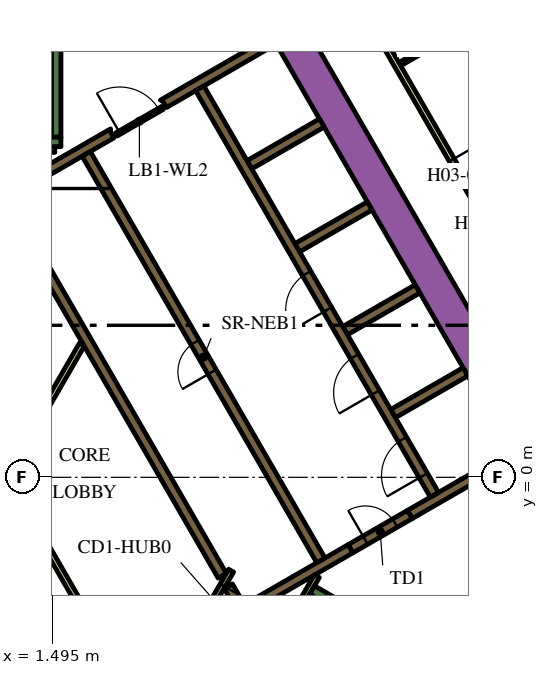
"""IFC4 building model, lengths in metres.
Left out: names, types, materials, properties, quantities, classifications, styles, units other than length and angle.
Written with IfcOpenShell. Run it as: python <this file> out.ifc"""

import sys

from ifc_helpers import new_model, si_unit, direction, frame, frame_2d, origin, place, context, subcontext, project, spatial, polyline, rectangle, outline, extrude, element, fill, save


model = new_model("IFC4")
c1 = context("Model", 3, precision=1e-05, world=origin(), true_north=direction((0.0, 1.0)))
c2 = subcontext(c1, "Body", "Model", "MODEL_VIEW")
j1 = project(units=[si_unit("LENGTHUNIT", "METRE"), si_unit("PLANEANGLEUNIT", "RADIAN")], contexts=[c1])
p1 = place(None, origin())
s1 = spatial("IfcSite", under=j1, at=p1, CompositionType="ELEMENT")
p2 = place(p1, origin())
s2 = spatial("IfcBuilding", under=s1, at=p2, CompositionType="ELEMENT")
p3 = place(p2, frame((0.0, 0.0, 51.0)))
s3 = spatial("IfcBuildingStorey", under=s2, at=p3, CompositionType="ELEMENT", Elevation=51.0)
p4 = place(p3, frame((6.776, 13.364, 0.0), z_axis=(0.0, 0.0, 1.0), x_axis=(0.500004177138, -0.8660229921, 0.0)))
e1 = element("IfcWall", 1, at=p4, inside=s3, PredefinedType="SOLIDWALL", context=c2, shape_type="SweptSolid", body=[
    extrude(rectangle(XDim=20.204, YDim=0.9, at=frame_2d((10.102, 0.0))), origin(), (0.0, 0.0, 1.0), 3.9),
])
p5 = place(p3, frame((8.334, -2.964, 0.0), z_axis=(0.0, 0.0, 1.0), x_axis=(0.866016039709, -0.500016218704, 0.0)))
e2 = element("IfcWall", 2, at=p5, inside=s3, PredefinedType="SOLIDWALL", context=c2, shape_type="SweptSolid", body=[
    extrude(rectangle(XDim=7.05, YDim=0.25, at=frame_2d((3.525, 0.0))), origin(), (0.0, 0.0, 1.0), 3.9),
])
p6 = place(p3, frame((8.168, -3.503, 0.0), z_axis=(0.0, 0.0, 1.0), x_axis=(0.49972245349, 0.866185586049, 0.0)))
e3 = element("IfcWall", 3, at=p6, inside=s3, PredefinedType="SOLIDWALL", context=c2, shape_type="SweptSolid", body=[
    extrude(rectangle(XDim=0.425, YDim=0.25, at=frame_2d((0.212, 0.0))), origin(), (0.0, 0.0, 1.0), 3.9),
])
p7 = place(p3, frame((1.6, 8.95, 0.0), z_axis=(0.0, 0.0, 1.0), x_axis=(0.0, 1.0, 0.0)))
e4 = element("IfcWall", 4, at=p7, inside=s3, PredefinedType="SOLIDWALL", context=c2, shape_type="SweptSolid", body=[
    extrude(rectangle(XDim=6.8, YDim=0.25, at=frame_2d((3.4, 0.0))), origin(), (0.0, 0.0, 1.0), 3.9),
])
p8 = place(p3, frame((1.05, 8.825, 0.0), z_axis=(0.0, 0.0, 1.0), x_axis=(1.0, 0.0, 0.0)))
e5 = element("IfcWall", 5, at=p8, inside=s3, PredefinedType="SOLIDWALL", context=c2, shape_type="SweptSolid", body=[
    extrude(rectangle(XDim=0.675, YDim=0.25, at=frame_2d((0.337, 0.0))), origin(), (0.0, 0.0, 1.0), 3.9),
])
p9 = place(p3, frame((10.464, 1.677, 0.0), z_axis=(0.0, 0.0, 1.0), x_axis=(0.86605622881, 0.499946605688, 0.0)))
e6 = element("IfcWall", 6, at=p9, inside=s3, PredefinedType="SOLIDWALL", context=c2, shape_type="SweptSolid", body=[
    extrude(rectangle(XDim=2.2, YDim=0.25, at=frame_2d((1.1, 0.0))), origin(), (0.0, 0.0, 1.0), 3.9),
])
p10 = place(p3, frame((13.629, 0.594, 0.0), z_axis=(0.0, 0.0, 1.0), x_axis=(-0.86602790099, -0.499995674689, 0.0)))
e7 = element("IfcWall", 7, at=p10, inside=s3, PredefinedType="SOLIDWALL", context=c2, shape_type="SweptSolid", body=[
    extrude(rectangle(XDim=3.146, YDim=0.25, at=frame_2d((1.573, 0.0))), origin(), (0.0, 0.0, 1.0), 3.9),
])
p11 = place(p3, frame((9.346, -1.879, 0.0), z_axis=(0.0, 0.0, 1.0), x_axis=(-0.866048528039, -0.499959945477, 0.0)))
e8 = element("IfcWall", 8, at=p11, inside=s3, PredefinedType="SOLIDWALL", context=c2, shape_type="SweptSolid", body=[
    extrude(rectangle(XDim=3.47, YDim=0.25, at=frame_2d((1.735, 0.0))), origin(), (0.0, 0.0, 1.0), 3.9),
])
p12 = place(p3, frame((6.13, -2.867, 0.0), z_axis=(0.0, 0.0, 1.0), x_axis=(0.500160776593, -0.865932559475, 0.0)))
e9 = element("IfcWall", 9, at=p12, inside=s3, PredefinedType="SOLIDWALL", context=c2, shape_type="SweptSolid", body=[
    extrude(rectangle(XDim=0.627, YDim=0.25, at=frame_2d((0.313, 0.0))), origin(), (0.0, 0.0, 1.0), 3.9),
])
for number, where, z_axis, x_axis in (
    (10, (9.204, 3.859, 0.0), (0.0, 0.0, 1.0), (0.866, 0.5, 0.0)),
    (11, (7.944, 6.041, 0.0), (0.0, 0.0, 1.0), (0.866, 0.5, 0.0)),
    (12, (6.684, 8.224, 0.0), (0.0, 0.0, 1.0), (0.866, 0.5, 0.0)),
):
    element("IfcWall", number, at=place(p3, frame(where, z_axis=z_axis, x_axis=x_axis)), inside=s3, PredefinedType="SOLIDWALL", context=c2, shape_type="SweptSolid", body=[
        extrude(rectangle(XDim=2.2, YDim=0.25, at=frame_2d((1.1, 0.0))), origin(), (0.0, 0.0, 1.0), 3.9),
    ])
p13 = place(p3, origin())
e13 = element("IfcWall", 13, at=p13, inside=s3, PredefinedType="SOLIDWALL", context=c2, shape_type="SweptSolid", body=[
    extrude(outline(polyline([(2.776, 8.733), (2.499, 8.573), (2.498, 8.573), (2.498, 8.573), (2.282, 8.448), (2.282, 8.448), (0.377, 7.348), (0.16, 7.223), (0.035, 7.439), (3.032, 9.169), (3.03, 9.152), (3.03, 9.133), (3.031, 9.113), (3.035, 9.094), (3.04, 9.075), (3.047, 9.057), (3.056, 9.039), (3.119, 8.931), (2.776, 8.733)])), origin(), (0.0, 0.0, 1.0), 3.9),
])
e14 = element("IfcWall", 14, at=p13, inside=s3, PredefinedType="SOLIDWALL", context=c2, shape_type="SweptSolid", body=[
    extrude(outline(polyline([(5.27, 10.173), (5.27, 10.173), (4.683, 9.834), (4.504, 9.731), (4.442, 9.839), (4.431, 9.856), (4.419, 9.871), (4.406, 9.885), (4.39, 9.898), (4.374, 9.909), (4.357, 9.918), (4.341, 9.925), (7.266, 11.614), (7.391, 11.398), (5.486, 10.298), (5.486, 10.298), (5.27, 10.173), (5.27, 10.173)])), origin(), (0.0, 0.0, 1.0), 3.9),
])
p14 = place(p3, frame((5.97, -2.591, 0.0), z_axis=(0.0, 0.0, 1.0), x_axis=(-0.499994469932, 0.866028596547, 0.0)))
e15 = element("IfcWall", 15, at=p14, inside=s3, PredefinedType="SOLIDWALL", context=c2, shape_type="SweptSolid", body=[
    extrude(rectangle(XDim=10.488, YDim=0.25, at=frame_2d((5.244, 0.0))), origin(), (0.0, 0.0, 1.0), 3.9),
])
p15 = place(p3, frame((8.459, -2.599, 0.0), z_axis=(0.0, 0.0, 1.0), x_axis=(-0.500041054325, -0.866001699761, 0.0)))
e16 = element("IfcWall", 16, at=p15, inside=s3, PredefinedType="PARTITIONING", context=c2, shape_type="SweptSolid", body=[
    extrude(rectangle(XDim=0.929, YDim=0.15, at=frame_2d((0.464, 0.0))), origin(), (0.0, 0.0, 1.0), 3.9),
])
p16 = place(p3, frame((2.435, -3.718, 0.0), z_axis=(0.0, 0.0, 1.0), x_axis=(-0.499985176046, 0.866033962229, 0.0)))
e17 = element("IfcWall", 17, at=p16, inside=s3, PredefinedType="PARTITIONING", context=c2, shape_type="SweptSolid", body=[
    extrude(rectangle(XDim=8.875, YDim=0.15, at=frame_2d((4.438, 0.0))), origin(), (0.0, 0.0, 1.0), 2.75),
])
p17 = place(p3, frame((0.336, 0.132, 0.0), z_axis=(0.0, 0.0, 1.0), x_axis=(0.500001957507, 0.866024273614, 0.0)))
e18 = element("IfcWall", 18, at=p17, inside=s3, PredefinedType="PARTITIONING", context=c2, shape_type="SweptSolid", body=[
    extrude(rectangle(XDim=3.881, YDim=0.15, at=frame_2d((1.941, 0.0))), origin(), (0.0, 0.0, 1.0), 2.75),
])
p18 = place(p3, frame((1.05, 8.625, 0.0), z_axis=(0.0, 0.0, 1.0), x_axis=(1.0, 0.0, 0.0)))
e19 = element("IfcWall", 19, at=p18, inside=s3, PredefinedType="PARTITIONING", context=c2, shape_type="SweptSolid", body=[
    extrude(rectangle(XDim=0.514, YDim=0.15, at=frame_2d((0.257, 0.0))), origin(), (0.0, 0.0, 1.0), 2.75),
])
p19 = place(p3, frame((11.553, -0.46, 0.0), z_axis=(0.0, 0.0, 1.0), x_axis=(-0.500006514828, 0.866021642414, 0.0)))
e20 = element("IfcWall", 20, at=p19, inside=s3, PredefinedType="SOLIDWALL", context=c2, shape_type="SweptSolid", body=[
    extrude(rectangle(XDim=12.35, YDim=0.25, at=frame_2d((6.175, 0.0))), origin(), (0.0, 0.0, 1.0), 3.9),
])
p20 = place(p19, frame((0.585, 0.0, 0.0)))
e21 = element("IfcOpeningElement", 21, at=p20, cuts=e20, PredefinedType="OPENING", context=c2, shape_type="SweptSolid", body=[
    extrude(rectangle(XDim=1.1, YDim=2.1, at=frame_2d((0.55, 1.05))), frame((0.0, 0.135, 0.0), z_axis=(0.0, -1.0, 0.0), x_axis=(1.0, 0.0, 0.0)), (0.0, 0.0, 1.0), 0.27),
])
p21 = place(p19, frame((3.105, 0.0, 0.0)))
e22 = element("IfcOpeningElement", 22, at=p21, cuts=e20, PredefinedType="OPENING", context=c2, shape_type="SweptSolid", body=[
    extrude(rectangle(XDim=1.1, YDim=2.1, at=frame_2d((0.55, 1.05))), frame((0.0, 0.135, 0.0), z_axis=(0.0, -1.0, 0.0), x_axis=(1.0, 0.0, 0.0)), (0.0, 0.0, 1.0), 0.27),
])
p22 = place(p19, frame((5.625, 0.0, 0.0)))
e23 = element("IfcOpeningElement", 23, at=p22, cuts=e20, PredefinedType="OPENING", context=c2, shape_type="SweptSolid", body=[
    extrude(rectangle(XDim=1.1, YDim=2.1, at=frame_2d((0.55, 1.05))), frame((0.0, 0.135, 0.0), z_axis=(0.0, -1.0, 0.0), x_axis=(1.0, 0.0, 0.0)), (0.0, 0.0, 1.0), 0.27),
])
p23 = place(p3, frame((8.565, -2.185, 0.0), z_axis=(0.0, 0.0, 1.0), x_axis=(-0.499997954832, 0.866026584559, 0.0)))
e24 = element("IfcWall", 24, at=p23, inside=s3, PredefinedType="SOLIDWALL", context=c2, shape_type="SweptSolid", body=[
    extrude(rectangle(XDim=12.35, YDim=0.25, at=frame_2d((6.175, 0.0))), origin(), (0.0, 0.0, 1.0), 3.9),
])
p24 = place(p23, frame((5.725, 0.0, 0.0)))
e25 = element("IfcOpeningElement", 25, at=p24, cuts=e24, PredefinedType="OPENING", context=c2, shape_type="SweptSolid", body=[
    extrude(rectangle(XDim=0.9, YDim=2.1, at=frame_2d((0.45, 1.05))), frame((0.0, 0.135, 0.0), z_axis=(0.0, -1.0, 0.0), x_axis=(1.0, 0.0, 0.0)), (0.0, 0.0, 1.0), 0.27),
])
p25 = place(p3, frame((9.346, -1.879, 0.0), z_axis=(0.0, 0.0, 1.0), x_axis=(0.866047807691, 0.499961193289, 0.0)))
e26 = element("IfcWall", 26, at=p25, inside=s3, PredefinedType="SOLIDWALL", context=c2, shape_type="SweptSolid", body=[
    extrude(rectangle(XDim=1.8, YDim=0.25, at=frame_2d((0.9, 0.0))), origin(), (0.0, 0.0, 1.0), 3.9),
])
p26 = place(p25, frame((0.45, 0.0, 0.0)))
e27 = element("IfcOpeningElement", 27, at=p26, cuts=e26, PredefinedType="OPENING", context=c2, shape_type="SweptSolid", body=[
    extrude(rectangle(XDim=0.9, YDim=2.1, at=frame_2d((0.45, 1.05))), frame((0.0, 0.135, 0.0), z_axis=(0.0, -1.0, 0.0), x_axis=(1.0, 0.0, 0.0)), (0.0, 0.0, 1.0), 0.27),
])
p27 = place(p3, frame((6.203, -2.456, 0.0), z_axis=(0.0, 0.0, 1.0), x_axis=(-0.500043961785, -0.866000020948, 0.0)))
e28 = element("IfcWall", 28, at=p27, inside=s3, PredefinedType="PARTITIONING", context=c2, shape_type="SweptSolid", body=[
    extrude(rectangle(XDim=1.95, YDim=0.15, at=frame_2d((0.975, 0.0))), origin(), (0.0, 0.0, 1.0), 3.9),
])
p28 = place(p27, frame((0.45, 0.0, 0.0)))
e29 = element("IfcOpeningElement", 29, at=p28, cuts=e28, PredefinedType="OPENING", context=c2, shape_type="SweptSolid", body=[
    extrude(rectangle(XDim=0.9, YDim=2.1, at=frame_2d((0.45, 1.05))), frame((0.0, 0.085, 0.0), z_axis=(0.0, -1.0, 0.0), x_axis=(1.0, 0.0, 0.0)), (0.0, 0.0, 1.0), 0.17),
])
p29 = place(p3, frame((3.183, 9.02, 0.0), z_axis=(0.0, 0.0, 1.0), x_axis=(0.866034573852, 0.49998411664, 0.0)))
e30 = element("IfcWall", 30, at=p29, inside=s3, PredefinedType="PARTITIONING", context=c2, shape_type="SweptSolid", body=[
    extrude(rectangle(XDim=1.4, YDim=0.09, at=frame_2d((0.7, 0.0))), origin(), (0.0, 0.0, 1.0), 2.75),
])
p30 = place(p29, frame((0.1, 0.0, 0.0)))
e31 = element("IfcOpeningElement", 31, at=p30, cuts=e30, PredefinedType="OPENING", context=c2, shape_type="SweptSolid", body=[
    extrude(rectangle(XDim=1.2, YDim=2.1, at=frame_2d((0.6, 1.05))), frame((0.0, 0.055, 0.0), z_axis=(0.0, -1.0, 0.0), x_axis=(1.0, 0.0, 0.0)), (0.0, 0.0, 1.0), 0.11),
])
p31 = place(p3, frame((6.163, 18.475, 0.0), z_axis=(0.0, 0.0, 1.0), x_axis=(0.500001317485, -0.866024643133, 0.0)))
e32 = element("IfcWall", 32, at=p31, inside=s3, PredefinedType="PARTITIONING", context=c2, shape_type="SweptSolid", body=[
    extrude(rectangle(XDim=25.767, YDim=0.15, at=frame_2d((12.883, 0.0))), origin(), (0.0, 0.0, 1.0), 2.75),
])
p32 = place(p31, frame((24.586, 0.0, 0.0)))
e33 = element("IfcOpeningElement", 33, at=p32, cuts=e32, PredefinedType="OPENING", context=c2, shape_type="SweptSolid", body=[
    extrude(rectangle(XDim=1.0, YDim=2.1, at=frame_2d((0.5, 1.05))), frame((0.0, 0.085, 0.0), z_axis=(0.0, -1.0, 0.0), x_axis=(1.0, 0.0, 0.0)), (0.0, 0.0, 1.0), 0.17),
])
p33 = place(p31, frame((13.144, 0.0, 0.0)))
e34 = element("IfcOpeningElement", 34, at=p33, cuts=e32, PredefinedType="OPENING", context=c2, shape_type="SweptSolid", body=[
    extrude(rectangle(XDim=1.0, YDim=2.1, at=frame_2d((0.5, 1.05))), frame((0.0, 0.085, 0.0), z_axis=(0.0, -1.0, 0.0), x_axis=(1.0, 0.0, 0.0)), (0.0, 0.0, 1.0), 0.17),
])
p34 = place(p31, frame((11.692, 0.0, 0.0)))
e35 = element("IfcOpeningElement", 35, at=p34, cuts=e32, PredefinedType="OPENING", context=c2, shape_type="SweptSolid", body=[
    extrude(rectangle(XDim=1.0, YDim=2.1, at=frame_2d((0.5, 1.05))), frame((0.0, 0.085, 0.0), z_axis=(0.0, -1.0, 0.0), x_axis=(1.0, 0.0, 0.0)), (0.0, 0.0, 1.0), 0.17),
])
p35 = place(p31, frame((0.572, 0.0, 0.0)))
e36 = element("IfcOpeningElement", 36, at=p35, cuts=e32, PredefinedType="OPENING", context=c2, shape_type="SweptSolid", body=[
    extrude(rectangle(XDim=1.0, YDim=2.1, at=frame_2d((0.5, 1.05))), frame((0.0, 0.085, 0.0), z_axis=(0.0, -1.0, 0.0), x_axis=(1.0, 0.0, 0.0)), (0.0, 0.0, 1.0), 0.17),
])
p36 = place(p3, frame((10.64, 10.871, 0.0), z_axis=(0.0, 0.0, 1.0), x_axis=(0.866036505625, 0.499980770555, 0.0)))
e37 = element("IfcWall", 37, at=p36, inside=s3, PredefinedType="PARTITIONING", context=c2, shape_type="SweptSolid", body=[
    extrude(rectangle(XDim=2.7, YDim=0.1, at=frame_2d((1.35, 0.0))), origin(), (0.0, 0.0, 1.0), 2.75),
])
p37 = place(p36, frame((0.6, 0.0, 0.0)))
e38 = element("IfcOpeningElement", 38, at=p37, cuts=e37, PredefinedType="OPENING", context=c2, shape_type="SweptSolid", body=[
    extrude(rectangle(XDim=0.9, YDim=2.1, at=frame_2d((0.45, 1.05))), frame((0.0, 0.06, 0.0), z_axis=(0.0, -1.0, 0.0), x_axis=(1.0, 0.0, 0.0)), (0.0, 0.0, 1.0), 0.12),
])
p38 = place(p20, origin())
e39 = element("IfcDoor", 39, at=p38, inside=s3, OperationType="DOUBLE_DOOR_SLIDING", PredefinedType="DOOR", context=c2, shape_type="SweptSolid", body=[
    extrude(rectangle(XDim=1.1, YDim=2.1, at=frame_2d((0.55, 1.05))), frame((0.0, 0.025, 0.0), z_axis=(0.0, -1.0, 0.0), x_axis=(1.0, 0.0, 0.0)), (0.0, 0.0, 1.0), 0.05),
])
fill(e21, e39)
p39 = place(p21, origin())
e40 = element("IfcDoor", 40, at=p39, inside=s3, OperationType="DOUBLE_DOOR_SLIDING", PredefinedType="DOOR", context=c2, shape_type="SweptSolid", body=[
    extrude(rectangle(XDim=1.1, YDim=2.1, at=frame_2d((0.55, 1.05))), frame((0.0, 0.025, 0.0), z_axis=(0.0, -1.0, 0.0), x_axis=(1.0, 0.0, 0.0)), (0.0, 0.0, 1.0), 0.05),
])
fill(e22, e40)
p40 = place(p22, origin())
e41 = element("IfcDoor", 41, at=p40, inside=s3, OperationType="DOUBLE_DOOR_SLIDING", PredefinedType="DOOR", context=c2, shape_type="SweptSolid", body=[
    extrude(rectangle(XDim=1.1, YDim=2.1, at=frame_2d((0.55, 1.05))), frame((0.0, 0.025, 0.0), z_axis=(0.0, -1.0, 0.0), x_axis=(1.0, 0.0, 0.0)), (0.0, 0.0, 1.0), 0.05),
])
fill(e23, e41)
p41 = place(p24, origin())
e42 = element("IfcDoor", 42, at=p41, inside=s3, OperationType="SINGLE_SWING_LEFT", PredefinedType="DOOR", context=c2, shape_type="SweptSolid", body=[
    extrude(rectangle(XDim=0.9, YDim=2.1, at=frame_2d((0.45, 1.05))), frame((0.0, 0.025, 0.0), z_axis=(0.0, -1.0, 0.0), x_axis=(1.0, 0.0, 0.0)), (0.0, 0.0, 1.0), 0.05),
])
fill(e25, e42)
p42 = place(p26, origin())
e43 = element("IfcDoor", 43, at=p42, inside=s3, OperationType="SINGLE_SWING_LEFT", PredefinedType="DOOR", context=c2, shape_type="SweptSolid", body=[
    extrude(rectangle(XDim=0.9, YDim=2.1, at=frame_2d((0.45, 1.05))), frame((0.0, 0.025, 0.0), z_axis=(0.0, -1.0, 0.0), x_axis=(1.0, 0.0, 0.0)), (0.0, 0.0, 1.0), 0.05),
])
fill(e27, e43)
p43 = place(p28, origin())
e44 = element("IfcDoor", 44, at=p43, inside=s3, OperationType="SINGLE_SWING_LEFT", PredefinedType="DOOR", context=c2, shape_type="SweptSolid", body=[
    extrude(rectangle(XDim=0.9, YDim=2.1, at=frame_2d((0.45, 1.05))), frame((0.0, 0.025, 0.0), z_axis=(0.0, -1.0, 0.0), x_axis=(1.0, 0.0, 0.0)), (0.0, 0.0, 1.0), 0.05),
])
fill(e29, e44)
p44 = place(p30, origin())
e45 = element("IfcDoor", 45, at=p44, inside=s3, OperationType="SINGLE_SWING_LEFT", PredefinedType="DOOR", context=c2, shape_type="SweptSolid", body=[
    extrude(rectangle(XDim=1.2, YDim=2.1, at=frame_2d((0.6, 1.05))), frame((0.0, 0.025, 0.0), z_axis=(0.0, -1.0, 0.0), x_axis=(1.0, 0.0, 0.0)), (0.0, 0.0, 1.0), 0.05),
])
fill(e31, e45)
p45 = place(p34, origin())
e46 = element("IfcDoor", 46, at=p45, inside=s3, OperationType="SINGLE_SWING_RIGHT", PredefinedType="DOOR", context=c2, shape_type="SweptSolid", body=[
    extrude(rectangle(XDim=1.0, YDim=2.1, at=frame_2d((0.5, 1.05))), frame((0.0, 0.025, 0.0), z_axis=(0.0, -1.0, 0.0), x_axis=(1.0, 0.0, 0.0)), (0.0, 0.0, 1.0), 0.05),
])
fill(e35, e46)
p46 = place(p37, origin())
e47 = element("IfcDoor", 47, at=p46, inside=s3, OperationType="SINGLE_SWING_LEFT", PredefinedType="DOOR", context=c2, shape_type="SweptSolid", body=[
    extrude(rectangle(XDim=0.9, YDim=2.1, at=frame_2d((0.45, 1.05))), frame((0.0, 0.025, 0.0), z_axis=(0.0, -1.0, 0.0), x_axis=(1.0, 0.0, 0.0)), (0.0, 0.0, 1.0), 0.05),
])
fill(e38, e47)
save(model, sys.argv[1])
